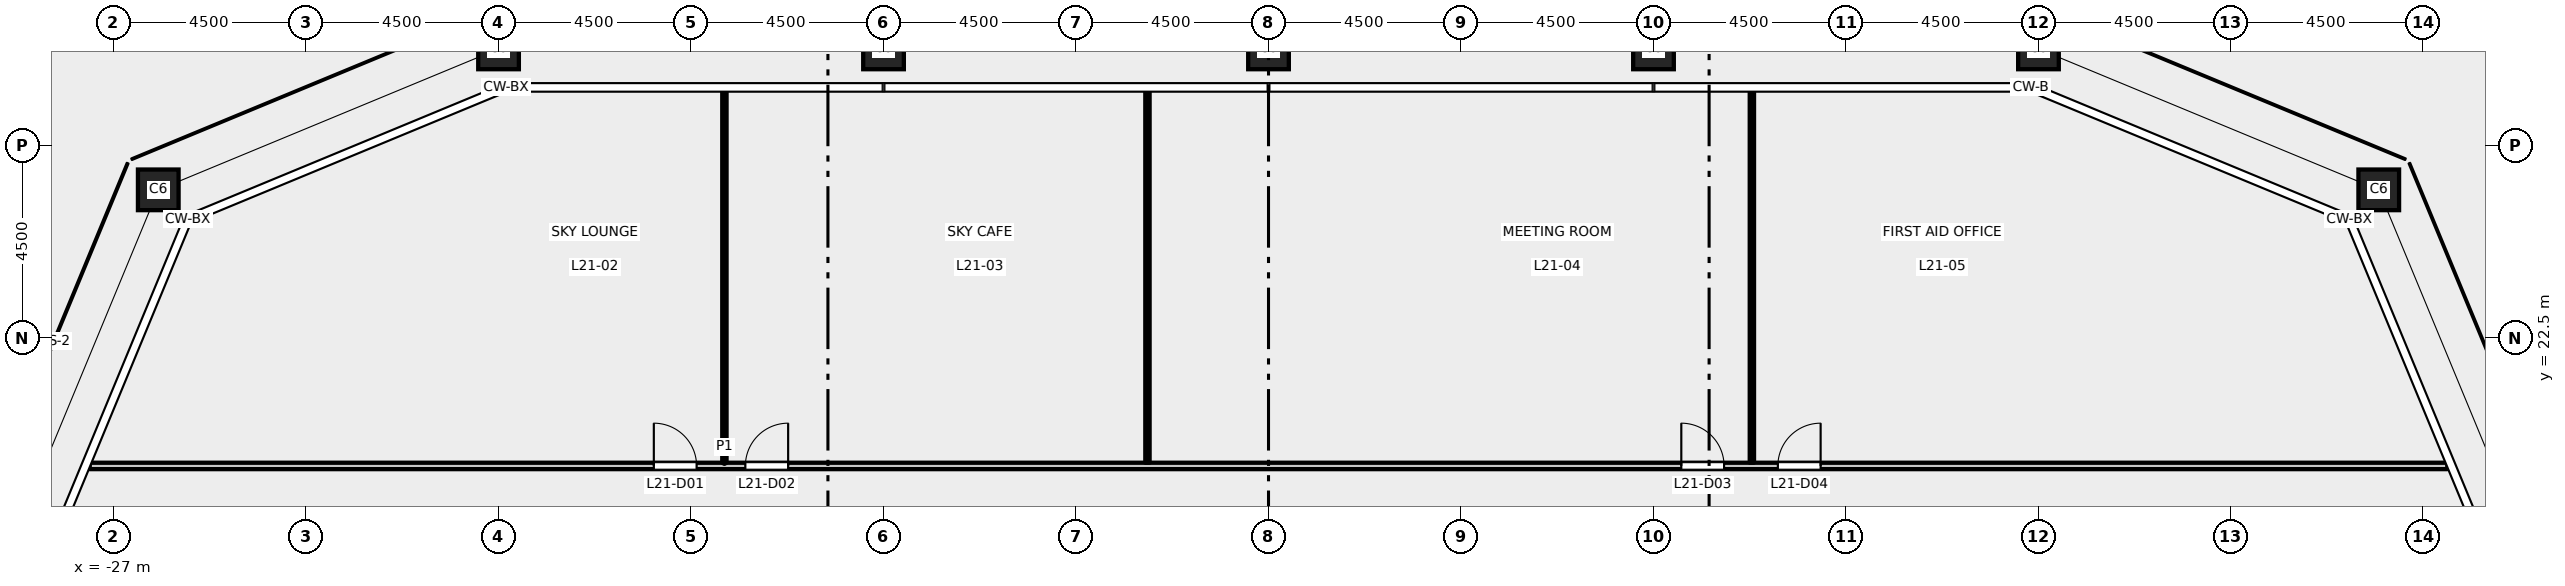
"""IFC4 building model, lengths in metres.
Left out: names, types, materials, properties, quantities, classifications, styles, units other than length and angle.
Written with IfcOpenShell. Run it as: python <this file> out.ifc"""

import sys

from ifc_helpers import new_model, si_unit, direction, frame, frame_2d, origin, origin_2d, place, context, subcontext, project, spatial, rectangle, hollow_rectangle, extrude, element, fill, save


model = new_model("IFC4")
c1 = context("Model", 3, precision=1e-05, world=origin(), true_north=direction((0.0, 1.0)))
c2 = subcontext(c1, "Body", "Model", "MODEL_VIEW")
j1 = project(units=[si_unit("LENGTHUNIT", "METRE"), si_unit("PLANEANGLEUNIT", "RADIAN")], contexts=[c1])
p1 = place(None, origin())
s1 = spatial("IfcSite", under=j1, at=p1, CompositionType="ELEMENT")
p2 = place(p1, origin())
s2 = spatial("IfcBuilding", under=s1, at=p2, CompositionType="ELEMENT")
p3 = place(p2, frame((0.0, 0.0, 99.2)))
s3 = spatial("IfcBuildingStorey", under=s2, at=p3, CompositionType="ELEMENT", Elevation=99.2)
for number, where, z_axis, x_axis in (
    (1, (25.955, 25.955, -0.2), (0.0, 0.0, 1.0), (1.0, 0.0, 0.0)),
    (2, (18.0, 29.25, -0.2), (0.0, 0.0, 1.0), (1.0, 0.0, 0.0)),
    (3, (9.0, 29.25, -0.2), (0.0, 0.0, 1.0), (1.0, 0.0, 0.0)),
    (4, (0.0, 29.25, -0.2), (0.0, 0.0, 1.0), (1.0, 0.0, 0.0)),
    (5, (-9.0, 29.25, -0.2), (0.0, 0.0, 1.0), (1.0, 0.0, 0.0)),
    (6, (-18.0, 29.25, -0.2), (0.0, 0.0, 1.0), (1.0, 0.0, 0.0)),
    (7, (-25.955, 25.955, -0.2), (0.0, 0.0, 1.0), (1.0, 0.0, 0.0)),
):
    element("IfcColumn", number, at=place(p3, frame(where, z_axis=z_axis, x_axis=x_axis)), inside=s3, PredefinedType="COLUMN", context=c2, shape_type="SweptSolid", body=[
        extrude(hollow_rectangle(XDim=0.95, YDim=0.95, WallThickness=0.055, at=origin_2d()), origin(), (0.0, 0.0, 1.0), 5.7),
    ])
p4 = place(p3, frame((-27.557, 19.5, 0.0), z_axis=(0.0, 0.0, 1.0), x_axis=(1.0, 0.0, 0.0)))
e8 = element("IfcWall", 8, at=p4, inside=s3, PredefinedType="PARTITIONING", context=c2, shape_type="SweptSolid", body=[
    extrude(rectangle(XDim=55.114, YDim=0.15, at=frame_2d((27.557, 0.0))), origin(), (0.0, 0.0, 1.0), 5.35),
])
p5 = place(p4, frame((13.187, 0.0, 0.0)))
e9 = element("IfcOpeningElement", 9, at=p5, cuts=e8, PredefinedType="OPENING", context=c2, shape_type="SweptSolid", body=[
    extrude(rectangle(XDim=1.0, YDim=2.1, at=frame_2d((0.5, 1.05))), frame((0.0, 0.085, 0.0), z_axis=(0.0, -1.0, 0.0), x_axis=(1.0, 0.0, 0.0)), (0.0, 0.0, 1.0), 0.17),
])
p6 = place(p4, frame((15.327, 0.0, 0.0)))
e10 = element("IfcOpeningElement", 10, at=p6, cuts=e8, PredefinedType="OPENING", context=c2, shape_type="SweptSolid", body=[
    extrude(rectangle(XDim=1.0, YDim=2.1, at=frame_2d((0.5, 1.05))), frame((0.0, 0.085, 0.0), z_axis=(0.0, -1.0, 0.0), x_axis=(1.0, 0.0, 0.0)), (0.0, 0.0, 1.0), 0.17),
])
p7 = place(p4, frame((37.207, 0.0, 0.0)))
e11 = element("IfcOpeningElement", 11, at=p7, cuts=e8, PredefinedType="OPENING", context=c2, shape_type="SweptSolid", body=[
    extrude(rectangle(XDim=1.0, YDim=2.1, at=frame_2d((0.5, 1.05))), frame((0.0, 0.085, 0.0), z_axis=(0.0, -1.0, 0.0), x_axis=(1.0, 0.0, 0.0)), (0.0, 0.0, 1.0), 0.17),
])
p8 = place(p4, frame((39.464, 0.0, 0.0)))
e12 = element("IfcOpeningElement", 12, at=p8, cuts=e8, PredefinedType="OPENING", context=c2, shape_type="SweptSolid", body=[
    extrude(rectangle(XDim=1.0, YDim=2.1, at=frame_2d((0.5, 1.05))), frame((0.0, 0.085, 0.0), z_axis=(0.0, -1.0, 0.0), x_axis=(1.0, 0.0, 0.0)), (0.0, 0.0, 1.0), 0.17),
])
for number, where, z_axis, x_axis in (
    (13, (-12.72, 19.575, 0.0), (0.0, 0.0, 1.0), (0.0, 1.0, 0.0)),
    (14, (-2.83, 19.575, 0.0), (0.0, 0.0, 1.0), (0.0, 1.0, 0.0)),
    (15, (11.3, 19.575, 0.0), (0.0, 0.0, 1.0), (0.0, 1.0, 0.0)),
):
    element("IfcWall", number, at=place(p3, frame(where, z_axis=z_axis, x_axis=x_axis)), inside=s3, PredefinedType="PARTITIONING", context=c2, shape_type="SweptSolid", body=[
        extrude(rectangle(XDim=8.685, YDim=0.1, at=frame_2d((4.343, 0.0))), origin(), (0.0, 0.0, 1.0), 5.35),
    ])
p9 = place(p5, origin())
e16 = element("IfcDoor", 16, at=p9, inside=s3, OperationType="SINGLE_SWING_LEFT", PredefinedType="DOOR", context=c2, shape_type="SweptSolid", body=[
    extrude(rectangle(XDim=1.0, YDim=2.1, at=frame_2d((0.5, 1.05))), frame((0.0, 0.025, 0.0), z_axis=(0.0, -1.0, 0.0), x_axis=(1.0, 0.0, 0.0)), (0.0, 0.0, 1.0), 0.05),
])
fill(e9, e16)
p10 = place(p6, origin())
e17 = element("IfcDoor", 17, at=p10, inside=s3, OperationType="SINGLE_SWING_RIGHT", PredefinedType="DOOR", context=c2, shape_type="SweptSolid", body=[
    extrude(rectangle(XDim=1.0, YDim=2.1, at=frame_2d((0.5, 1.05))), frame((0.0, 0.025, 0.0), z_axis=(0.0, -1.0, 0.0), x_axis=(1.0, 0.0, 0.0)), (0.0, 0.0, 1.0), 0.05),
])
fill(e10, e17)
p11 = place(p7, origin())
e18 = element("IfcDoor", 18, at=p11, inside=s3, OperationType="SINGLE_SWING_LEFT", PredefinedType="DOOR", context=c2, shape_type="SweptSolid", body=[
    extrude(rectangle(XDim=1.0, YDim=2.1, at=frame_2d((0.5, 1.05))), frame((0.0, 0.025, 0.0), z_axis=(0.0, -1.0, 0.0), x_axis=(1.0, 0.0, 0.0)), (0.0, 0.0, 1.0), 0.05),
])
fill(e11, e18)
p12 = place(p8, origin())
e19 = element("IfcDoor", 19, at=p12, inside=s3, OperationType="SINGLE_SWING_RIGHT", PredefinedType="DOOR", context=c2, shape_type="SweptSolid", body=[
    extrude(rectangle(XDim=1.0, YDim=2.1, at=frame_2d((0.5, 1.05))), frame((0.0, 0.025, 0.0), z_axis=(0.0, -1.0, 0.0), x_axis=(1.0, 0.0, 0.0)), (0.0, 0.0, 1.0), 0.05),
])
fill(e12, e19)
save(model, sys.argv[1])
